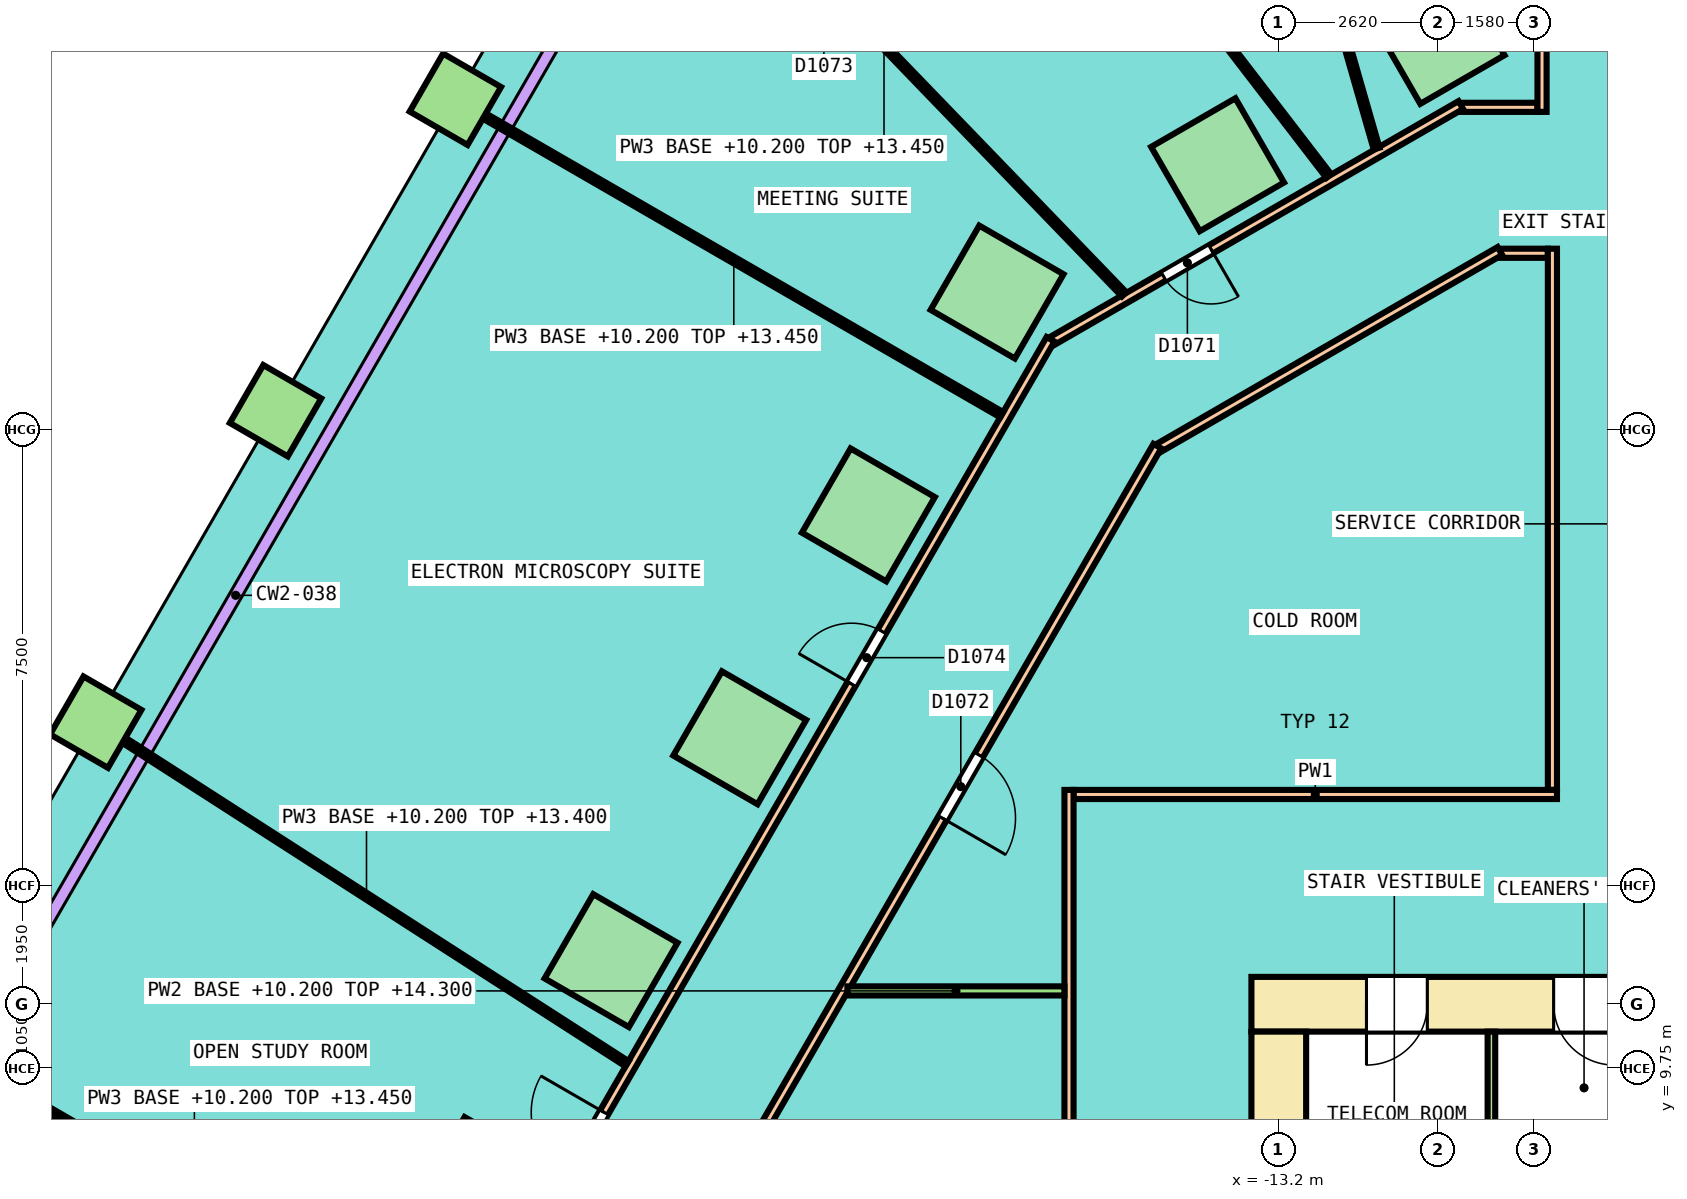
"""IFC4 building model, lengths in metres.
Left out: names, types, materials, properties, quantities, classifications, styles, units other than length and angle.
Written with IfcOpenShell. Run it as: python <this file> out.ifc"""

import sys

from ifc_helpers import new_model, si_unit, direction, frame, frame_2d, origin, origin_2d, place, context, subcontext, project, spatial, rectangle, extrude, element, fill, save


model = new_model("IFC4")
c1 = context("Model", 3, precision=1e-05, world=origin(), true_north=direction((0.0, 1.0)))
c2 = subcontext(c1, "Body", "Model", "MODEL_VIEW")
j1 = project(units=[si_unit("LENGTHUNIT", "METRE"), si_unit("PLANEANGLEUNIT", "RADIAN")], contexts=[c1])
p1 = place(None, origin())
s1 = spatial("IfcSite", under=j1, at=p1, CompositionType="ELEMENT")
p2 = place(p1, origin())
s2 = spatial("IfcBuilding", under=s1, at=p2, CompositionType="ELEMENT")
p3 = place(p2, frame((0.0, 0.0, 10.2)))
s3 = spatial("IfcBuildingStorey", under=s2, at=p3, CompositionType="ELEMENT", Elevation=10.2)
for number, where, z_axis, x_axis in (
    (1, (-10.58, 26.7, 0.0), (0.0, 0.0, 1.0), (-0.866, -0.5, 0.0)),
    (2, (-14.206, 24.606, 0.0), (0.0, 0.0, 1.0), (-0.866, -0.5, 0.0)),
    (3, (-17.833, 22.512, 0.0), (0.0, 0.0, 1.0), (-0.5, -0.866, 0.0)),
    (4, (-19.949, 18.847, 0.0), (0.0, 0.0, 1.0), (-0.5, -0.866, 0.0)),
    (5, (-22.065, 15.183, 0.0), (0.0, 0.0, 1.0), (-0.5, -0.866, 0.0)),
    (6, (-24.181, 11.518, 0.0), (0.0, 0.0, 1.0), (-0.5, -0.866, 0.0)),
    (7, (-26.297, 7.853, 0.0), (0.0, 0.0, 1.0), (-0.5, -0.866, 0.0)),
):
    element("IfcColumn", number, at=place(p3, frame(where, z_axis=z_axis, x_axis=x_axis)), inside=s3, PredefinedType="COLUMN", context=c2, shape_type="SweptSolid", body=[
        extrude(rectangle(XDim=1.6, YDim=1.6, at=origin_2d()), origin(), (0.0, 0.0, 1.0), 4.05),
    ])
for number, where, z_axis, x_axis in (
    (8, (-26.741, 25.682, 0.0), (0.0, 0.0, 1.0), (-0.5, -0.866, 0.0)),
    (9, (-29.698, 20.561, 0.0), (0.0, 0.0, 1.0), (-0.5, -0.866, 0.0)),
    (10, (-32.656, 15.439, 0.0), (0.0, 0.0, 1.0), (-0.5, -0.866, 0.0)),
):
    element("IfcColumn", number, at=place(p3, frame(where, z_axis=z_axis, x_axis=x_axis)), inside=s3, PredefinedType="COLUMN", context=c2, shape_type="SweptSolid", body=[
        extrude(rectangle(XDim=1.1, YDim=1.1, at=origin_2d()), origin(), (0.0, 0.0, 1.0), 4.05),
    ])
p4 = place(p3, frame((-13.65, 10.8, 0.0), z_axis=(0.0, 0.0, 1.0), x_axis=(1.0, 0.0, 0.0)))
e11 = element("IfcWall", 11, at=p4, inside=s3, PredefinedType="SHEAR", context=c2, shape_type="SweptSolid", body=[
    extrude(rectangle(XDim=27.3, YDim=0.9, at=frame_2d((13.65, 0.0))), origin(), (0.0, 0.0, 1.0), 4.1),
])
p5 = place(p4, frame((1.892, 0.0, 0.0)))
e12 = element("IfcOpeningElement", 12, at=p5, cuts=e11, PredefinedType="OPENING", context=c2, shape_type="SweptSolid", body=[
    extrude(rectangle(XDim=1.0, YDim=2.1, at=frame_2d((0.5, 1.05))), frame((0.0, 0.46, 0.0), z_axis=(0.0, -1.0, 0.0), x_axis=(1.0, 0.0, 0.0)), (0.0, 0.0, 1.0), 0.92),
])
p6 = place(p4, frame((4.97, 0.0, 0.0)))
e13 = element("IfcOpeningElement", 13, at=p6, cuts=e11, PredefinedType="OPENING", context=c2, shape_type="SweptSolid", body=[
    extrude(rectangle(XDim=1.0, YDim=2.1, at=frame_2d((0.5, 1.05))), frame((0.0, 0.46, 0.0), z_axis=(0.0, -1.0, 0.0), x_axis=(1.0, 0.0, 0.0)), (0.0, 0.0, 1.0), 0.92),
])
p7 = place(p4, frame((8.017, 0.0, 0.0)))
e14 = element("IfcOpeningElement", 14, at=p7, cuts=e11, PredefinedType="OPENING", context=c2, shape_type="SweptSolid", body=[
    extrude(rectangle(XDim=1.0, YDim=2.1, at=frame_2d((0.5, 1.05))), frame((0.0, 0.46, 0.0), z_axis=(0.0, -1.0, 0.0), x_axis=(1.0, 0.0, 0.0)), (0.0, 0.0, 1.0), 0.92),
])
p8 = place(p4, frame((11.064, 0.0, 0.0)))
e15 = element("IfcOpeningElement", 15, at=p8, cuts=e11, PredefinedType="OPENING", context=c2, shape_type="SweptSolid", body=[
    extrude(rectangle(XDim=1.0, YDim=2.1, at=frame_2d((0.5, 1.05))), frame((0.0, 0.46, 0.0), z_axis=(0.0, -1.0, 0.0), x_axis=(1.0, 0.0, 0.0)), (0.0, 0.0, 1.0), 0.92),
])
p9 = place(p4, frame((21.238, 0.0, 0.0)))
e16 = element("IfcOpeningElement", 16, at=p9, cuts=e11, PredefinedType="OPENING", context=c2, shape_type="SweptSolid", body=[
    extrude(rectangle(XDim=1.0, YDim=2.1, at=frame_2d((0.5, 1.05))), frame((0.0, 0.46, 0.0), z_axis=(0.0, -1.0, 0.0), x_axis=(1.0, 0.0, 0.0)), (0.0, 0.0, 1.0), 0.92),
])
p10 = place(p4, frame((14.575, 0.0, 0.0)))
e17 = element("IfcOpeningElement", 17, at=p10, cuts=e11, PredefinedType="OPENING", context=c2, shape_type="SweptSolid", body=[
    extrude(rectangle(XDim=1.4, YDim=2.1, at=frame_2d((0.7, 1.05))), frame((0.0, 0.46, 0.0), z_axis=(0.0, -1.0, 0.0), x_axis=(1.0, 0.0, 0.0)), (0.0, 0.0, 1.0), 0.92),
])
p11 = place(p3, frame((-13.2, -10.35, 0.0), z_axis=(0.0, 0.0, 1.0), x_axis=(0.0, 1.0, 0.0)))
e18 = element("IfcWall", 18, at=p11, inside=s3, PredefinedType="SHEAR", context=c2, shape_type="SweptSolid", body=[
    extrude(rectangle(XDim=20.7, YDim=0.9, at=frame_2d((10.35, 0.0))), origin(), (0.0, 0.0, 1.0), 4.1),
])
p12 = place(p11, frame((9.15, 0.0, 0.0)))
e19 = element("IfcOpeningElement", 19, at=p12, cuts=e18, PredefinedType="OPENING", context=c2, shape_type="SweptSolid", body=[
    extrude(rectangle(XDim=2.4, YDim=2.1, at=frame_2d((1.2, 1.05))), frame((0.0, 0.46, 0.0), z_axis=(0.0, -1.0, 0.0), x_axis=(1.0, 0.0, 0.0)), (0.0, 0.0, 1.0), 0.92),
])
p13 = place(p11, frame((16.05, 0.0, 0.0)))
e20 = element("IfcOpeningElement", 20, at=p13, cuts=e18, PredefinedType="OPENING", context=c2, shape_type="SweptSolid", body=[
    extrude(rectangle(XDim=1.2, YDim=2.1, at=frame_2d((0.6, 1.05))), frame((0.0, 0.46, 0.0), z_axis=(0.0, -1.0, 0.0), x_axis=(1.0, 0.0, 0.0)), (0.0, 0.0, 1.0), 0.92),
])
p14 = place(p11, frame((3.45, 0.0, 0.0)))
e21 = element("IfcOpeningElement", 21, at=p14, cuts=e18, PredefinedType="OPENING", context=c2, shape_type="SweptSolid", body=[
    extrude(rectangle(XDim=1.2, YDim=2.1, at=frame_2d((0.6, 1.05))), frame((0.0, 0.46, 0.0), z_axis=(0.0, -1.0, 0.0), x_axis=(1.0, 0.0, 0.0)), (0.0, 0.0, 1.0), 0.92),
])
p15 = place(p3, frame((-9.703, 8.5, 0.0), z_axis=(0.0, 0.0, 1.0), x_axis=(0.0, 1.0, 0.0)))
e22 = element("IfcWall", 22, at=p15, inside=s3, PredefinedType="PARTITIONING", context=c2, shape_type="SweptSolid", body=[
    extrude(rectangle(XDim=1.85, YDim=0.125, at=frame_2d((0.925, 0.0))), origin(), (0.0, 0.0, 1.0), 4.1),
])
p16 = place(p3, frame((-9.554, 23.15, 0.0), z_axis=(0.0, 0.0, 1.0), x_axis=(1.0, 0.0, 0.0)))
e23 = element("IfcWall", 23, at=p16, inside=s3, PredefinedType="PARTITIONING", context=c2, shape_type="SweptSolid", body=[
    extrude(rectangle(XDim=0.779, YDim=0.15, at=frame_2d((0.389, 0.0))), origin(), (0.0, 0.0, 1.0), 3.05),
])
p17 = place(p3, frame((-10.197, 25.55, 0.0), z_axis=(0.0, 0.0, 1.0), x_axis=(1.0, 0.0, 0.0)))
e24 = element("IfcWall", 24, at=p17, inside=s3, PredefinedType="PARTITIONING", context=c2, shape_type="SweptSolid", body=[
    extrude(rectangle(XDim=1.251, YDim=0.15, at=frame_2d((0.625, 0.0))), origin(), (0.0, 0.0, 1.0), 3.05),
])
p18 = place(p3, frame((-16.926, 21.708, 0.0), z_axis=(0.0, 0.0, 1.0), x_axis=(0.866023143435, 0.50000391502, 0.0)))
e25 = element("IfcWall", 25, at=p18, inside=s3, PredefinedType="PARTITIONING", context=c2, shape_type="SweptSolid", body=[
    extrude(rectangle(XDim=7.759, YDim=0.15, at=frame_2d((3.879, 0.0))), origin(), (0.0, 0.0, 1.0), 3.05),
])
p19 = place(p18, frame((2.117, 0.0, 0.0)))
e26 = element("IfcOpeningElement", 26, at=p19, cuts=e25, PredefinedType="OPENING", context=c2, shape_type="SweptSolid", body=[
    extrude(rectangle(XDim=0.9, YDim=2.1, at=frame_2d((0.45, 1.05))), frame((0.0, 0.085, 0.0), z_axis=(0.0, -1.0, 0.0), x_axis=(1.0, 0.0, 0.0)), (0.0, 0.0, 1.0), 0.17),
])
p20 = place(p3, frame((-8.871, 25.475, 0.0), z_axis=(0.0, 0.0, 1.0), x_axis=(0.0, 1.0, 0.0)))
e27 = element("IfcWall", 27, at=p20, inside=s3, PredefinedType="PARTITIONING", context=c2, shape_type="SweptSolid", body=[
    extrude(rectangle(XDim=2.15, YDim=0.15, at=frame_2d((1.075, 0.0))), origin(), (0.0, 0.0, 1.0), 3.25),
])
p21 = place(p3, frame((-15.169, 19.951, 0.0), z_axis=(0.0, 0.0, 1.0), x_axis=(0.866024786089, 0.500001069878, 0.0)))
e28 = element("IfcWall", 28, at=p21, inside=s3, PredefinedType="PARTITIONING", context=c2, shape_type="SweptSolid", body=[
    extrude(rectangle(XDim=6.473, YDim=0.15, at=frame_2d((3.236, 0.0))), origin(), (0.0, 0.0, 1.0), 3.05),
])
p22 = place(p3, frame((-24.825, 3.301, 0.0), z_axis=(0.0, 0.0, 1.0), x_axis=(0.499992422807, 0.866029778435, 0.0)))
e29 = element("IfcWall", 29, at=p22, inside=s3, PredefinedType="PARTITIONING", context=c2, shape_type="SweptSolid", body=[
    extrude(rectangle(XDim=19.257, YDim=0.15, at=frame_2d((9.628, 0.0))), origin(), (0.0, 0.0, 1.0), 3.05),
])
p23 = place(p22, frame((12.192, 0.0, 0.0)))
e30 = element("IfcOpeningElement", 30, at=p23, cuts=e29, PredefinedType="OPENING", context=c2, shape_type="SweptSolid", body=[
    extrude(rectangle(XDim=1.2, YDim=2.1, at=frame_2d((0.6, 1.05))), frame((0.0, 0.085, 0.0), z_axis=(0.0, -1.0, 0.0), x_axis=(1.0, 0.0, 0.0)), (0.0, 0.0, 1.0), 0.17),
])
p24 = place(p22, frame((2.097, 0.0, 0.0)))
e31 = element("IfcOpeningElement", 31, at=p24, cuts=e29, PredefinedType="OPENING", context=c2, shape_type="SweptSolid", body=[
    extrude(rectangle(XDim=1.0, YDim=2.1, at=frame_2d((0.5, 1.05))), frame((0.0, 0.085, 0.0), z_axis=(0.0, -1.0, 0.0), x_axis=(1.0, 0.0, 0.0)), (0.0, 0.0, 1.0), 0.17),
])
p25 = place(p3, frame((-27.225, 3.944, 0.0), z_axis=(0.0, 0.0, 1.0), x_axis=(0.499997805905, 0.866026670542, 0.0)))
e32 = element("IfcWall", 32, at=p25, inside=s3, PredefinedType="PARTITIONING", context=c2, shape_type="SweptSolid", body=[
    extrude(rectangle(XDim=20.543, YDim=0.15, at=frame_2d((10.272, 0.0))), origin(), (0.0, 0.0, 1.0), 3.05),
])
p26 = place(p25, frame((13.998, 0.0, 0.0)))
e33 = element("IfcOpeningElement", 33, at=p26, cuts=e32, PredefinedType="OPENING", context=c2, shape_type="SweptSolid", body=[
    extrude(rectangle(XDim=1.0, YDim=2.1, at=frame_2d((0.5, 1.05))), frame((0.0, 0.085, 0.0), z_axis=(0.0, -1.0, 0.0), x_axis=(1.0, 0.0, 0.0)), (0.0, 0.0, 1.0), 0.17),
])
p27 = place(p25, frame((4.663, 0.0, 0.0)))
e34 = element("IfcOpeningElement", 34, at=p27, cuts=e32, PredefinedType="OPENING", context=c2, shape_type="SweptSolid", body=[
    extrude(rectangle(XDim=1.2, YDim=2.1, at=frame_2d((0.6, 1.05))), frame((0.0, 0.085, 0.0), z_axis=(0.0, -1.0, 0.0), x_axis=(1.0, 0.0, 0.0)), (0.0, 0.0, 1.0), 0.17),
])
p28 = place(p3, frame((-8.7, 14.325, 0.0), z_axis=(0.0, 0.0, 1.0), x_axis=(0.0, 1.0, 0.0)))
e35 = element("IfcWall", 35, at=p28, inside=s3, PredefinedType="PARTITIONING", context=c2, shape_type="SweptSolid", body=[
    extrude(rectangle(XDim=8.9, YDim=0.15, at=frame_2d((4.45, 0.0))), origin(), (0.0, 0.0, 1.0), 3.05),
])
p29 = place(p3, frame((-16.575, 14.25, 0.0), z_axis=(0.0, 0.0, 1.0), x_axis=(1.0, 0.0, 0.0)))
e36 = element("IfcWall", 36, at=p29, inside=s3, PredefinedType="PARTITIONING", context=c2, shape_type="SweptSolid", body=[
    extrude(rectangle(XDim=7.95, YDim=0.15, at=frame_2d((3.975, 0.0))), origin(), (0.0, 0.0, 1.0), 3.05),
])
p30 = place(p3, frame((-16.65, -4.725, 0.0), z_axis=(0.0, 0.0, 1.0), x_axis=(0.0, 1.0, 0.0)))
e37 = element("IfcWall", 37, at=p30, inside=s3, PredefinedType="PARTITIONING", context=c2, shape_type="SweptSolid", body=[
    extrude(rectangle(XDim=19.05, YDim=0.15, at=frame_2d((9.525, 0.0))), origin(), (0.0, 0.0, 1.0), 3.05),
])
p31 = place(p30, frame((5.219, 0.0, 0.0)))
e38 = element("IfcOpeningElement", 38, at=p31, cuts=e37, PredefinedType="OPENING", context=c2, shape_type="SweptSolid", body=[
    extrude(rectangle(XDim=1.0, YDim=2.1, at=frame_2d((0.5, 1.05))), frame((0.0, 0.085, 0.0), z_axis=(0.0, -1.0, 0.0), x_axis=(1.0, 0.0, 0.0)), (0.0, 0.0, 1.0), 0.17),
])
p32 = place(p3, frame((-20.294, 11.02, 0.0), z_axis=(0.0, 0.0, 1.0), x_axis=(1.0, 0.0, 0.0)))
e39 = element("IfcWall", 39, at=p32, inside=s3, PredefinedType="PARTITIONING", context=c2, shape_type="SweptSolid", body=[
    extrude(rectangle(XDim=3.569, YDim=0.15, at=frame_2d((1.785, 0.0))), origin(), (0.0, 0.0, 1.0), 4.1),
])
p33 = place(p3, frame((-14.727, 35.8, 0.0), z_axis=(0.0, 0.0, 1.0), x_axis=(0.27581573325, -0.96121052912, 0.0)))
e40 = element("IfcWall", 40, at=p33, inside=s3, PredefinedType="PARTITIONING", context=c2, shape_type="SweptSolid", body=[
    extrude(rectangle(XDim=11.369, YDim=0.1, at=frame_2d((5.685, 0.0))), origin(), (0.0, 0.0, 1.0), 3.25),
])
p34 = place(p33, frame((6.684, 0.0, 0.0)))
e41 = element("IfcOpeningElement", 41, at=p34, cuts=e40, PredefinedType="OPENING", context=c2, shape_type="SweptSolid", body=[
    extrude(rectangle(XDim=1.0, YDim=2.1, at=frame_2d((0.5, 1.05))), frame((0.0, 0.06, 0.0), z_axis=(0.0, -1.0, 0.0), x_axis=(1.0, 0.0, 0.0)), (0.0, 0.0, 1.0), 0.12),
])
p35 = place(p3, frame((-19.162, 33.242, 0.0), z_axis=(0.0, 0.0, 1.0), x_axis=(0.609546416877, -0.79275038043, 0.0)))
e42 = element("IfcWall", 42, at=p35, inside=s3, PredefinedType="PARTITIONING", context=c2, shape_type="SweptSolid", body=[
    extrude(rectangle(XDim=11.129, YDim=0.1, at=frame_2d((5.564, 0.0))), origin(), (0.0, 0.0, 1.0), 3.2),
])
p36 = place(p3, frame((-23.64, 30.654, 0.0), z_axis=(0.0, 0.0, 1.0), x_axis=(0.694530893364, -0.719462881713, 0.0)))
e43 = element("IfcWall", 43, at=p36, inside=s3, PredefinedType="PARTITIONING", context=c2, shape_type="SweptSolid", body=[
    extrude(rectangle(XDim=11.369, YDim=0.1, at=frame_2d((5.685, 0.0))), origin(), (0.0, 0.0, 1.0), 3.25),
])
p37 = place(p36, frame((3.76, 0.0, 0.0)))
e44 = element("IfcOpeningElement", 44, at=p37, cuts=e43, PredefinedType="OPENING", context=c2, shape_type="SweptSolid", body=[
    extrude(rectangle(XDim=1.0, YDim=2.1, at=frame_2d((0.5, 1.05))), frame((0.0, 0.06, 0.0), z_axis=(0.0, -1.0, 0.0), x_axis=(1.0, 0.0, 0.0)), (0.0, 0.0, 1.0), 0.12),
])
p38 = place(p3, frame((-26.568, 25.582, 0.0), z_axis=(0.0, 0.0, 1.0), x_axis=(0.866028554658, -0.499994542487, 0.0)))
e45 = element("IfcWall", 45, at=p38, inside=s3, PredefinedType="PARTITIONING", context=c2, shape_type="SweptSolid", body=[
    extrude(rectangle(XDim=10.175, YDim=0.1, at=frame_2d((5.087, 0.0))), origin(), (0.0, 0.0, 1.0), 3.25),
])
p39 = place(p3, frame((-32.487, 15.331, 0.0), z_axis=(0.0, 0.0, 1.0), x_axis=(0.841149662558, -0.540802408628, 0.0)))
e46 = element("IfcWall", 46, at=p39, inside=s3, PredefinedType="PARTITIONING", context=c2, shape_type="SweptSolid", body=[
    extrude(rectangle(XDim=10.187, YDim=0.1, at=frame_2d((5.093, 0.0))), origin(), (0.0, 0.0, 1.0), 3.2),
])
p40 = place(p3, frame((-35.439, 10.218, 0.0), z_axis=(0.0, 0.0, 1.0), x_axis=(0.86602416344, -0.500002148333, 0.0)))
e47 = element("IfcWall", 47, at=p40, inside=s3, PredefinedType="PARTITIONING", context=c2, shape_type="SweptSolid", body=[
    extrude(rectangle(XDim=10.175, YDim=0.1, at=frame_2d((5.088, 0.0))), origin(), (0.0, 0.0, 1.0), 3.25),
])
p41 = place(p40, frame((4.625, 0.0, 0.0)))
e48 = element("IfcOpeningElement", 48, at=p41, cuts=e47, PredefinedType="OPENING", context=c2, shape_type="SweptSolid", body=[
    extrude(rectangle(XDim=1.0, YDim=2.1, at=frame_2d((0.5, 1.05))), frame((0.0, 0.06, 0.0), z_axis=(0.0, -1.0, 0.0), x_axis=(1.0, 0.0, 0.0)), (0.0, 0.0, 1.0), 0.12),
])
p42 = place(p5, origin())
e49 = element("IfcDoor", 49, at=p42, inside=s3, OperationType="SINGLE_SWING_RIGHT", PredefinedType="DOOR", context=c2, shape_type="SweptSolid", body=[
    extrude(rectangle(XDim=1.0, YDim=2.1, at=frame_2d((0.5, 1.05))), frame((0.0, 0.3, 0.0), z_axis=(0.0, -1.0, 0.0), x_axis=(1.0, 0.0, 0.0)), (0.0, 0.0, 1.0), 0.6),
])
fill(e12, e49)
p43 = place(p6, origin())
e50 = element("IfcDoor", 50, at=p43, inside=s3, OperationType="SINGLE_SWING_LEFT", PredefinedType="DOOR", context=c2, shape_type="SweptSolid", body=[
    extrude(rectangle(XDim=1.0, YDim=2.1, at=frame_2d((0.5, 1.05))), frame((0.0, 0.3, 0.0), z_axis=(0.0, -1.0, 0.0), x_axis=(1.0, 0.0, 0.0)), (0.0, 0.0, 1.0), 0.6),
])
fill(e13, e50)
p44 = place(p19, origin())
e51 = element("IfcDoor", 51, at=p44, inside=s3, OperationType="SINGLE_SWING_RIGHT", PredefinedType="DOOR", context=c2, shape_type="SweptSolid", body=[
    extrude(rectangle(XDim=0.9, YDim=2.1, at=frame_2d((0.45, 1.05))), frame((0.0, 0.025, 0.0), z_axis=(0.0, -1.0, 0.0), x_axis=(1.0, 0.0, 0.0)), (0.0, 0.0, 1.0), 0.05),
])
fill(e26, e51)
p45 = place(p23, origin())
e52 = element("IfcDoor", 52, at=p45, inside=s3, OperationType="DOUBLE_DOOR_SINGLE_SWING", PredefinedType="DOOR", context=c2, shape_type="SweptSolid", body=[
    extrude(rectangle(XDim=1.2, YDim=2.1, at=frame_2d((0.6, 1.05))), frame((0.0, 0.025, 0.0), z_axis=(0.0, -1.0, 0.0), x_axis=(1.0, 0.0, 0.0)), (0.0, 0.0, 1.0), 0.05),
])
fill(e30, e52)
p46 = place(p26, origin())
e53 = element("IfcDoor", 53, at=p46, inside=s3, OperationType="SINGLE_SWING_LEFT", PredefinedType="DOOR", context=c2, shape_type="SweptSolid", body=[
    extrude(rectangle(XDim=1.0, YDim=2.1, at=frame_2d((0.5, 1.05))), frame((0.0, 0.025, 0.0), z_axis=(0.0, -1.0, 0.0), x_axis=(1.0, 0.0, 0.0)), (0.0, 0.0, 1.0), 0.05),
])
fill(e33, e53)
p47 = place(p27, origin())
e54 = element("IfcDoor", 54, at=p47, inside=s3, OperationType="DOUBLE_DOOR_SINGLE_SWING", PredefinedType="DOOR", context=c2, shape_type="SweptSolid", body=[
    extrude(rectangle(XDim=1.2, YDim=2.1, at=frame_2d((0.6, 1.05))), frame((0.0, 0.025, 0.0), z_axis=(0.0, -1.0, 0.0), x_axis=(1.0, 0.0, 0.0)), (0.0, 0.0, 1.0), 0.05),
])
fill(e34, e54)
save(model, sys.argv[1])
